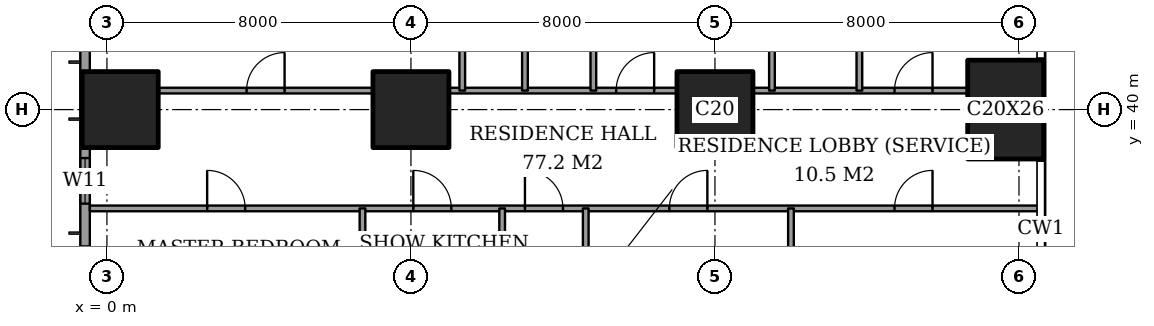
"""IFC4 building model, lengths in metres.
Left out: names, types, materials, properties, quantities, classifications, styles, units other than length and angle.
Written with IfcOpenShell. Run it as: python <this file> out.ifc"""

import sys

from ifc_helpers import new_model, si_unit, direction, frame, frame_2d, origin, origin_2d, place, context, subcontext, project, spatial, rectangle, extrude, element, fill, save


model = new_model("IFC4")
c1 = context("Model", 3, precision=1e-05, world=origin(), true_north=direction((0.0, 1.0)))
c2 = subcontext(c1, "Body", "Model", "MODEL_VIEW")
j1 = project(units=[si_unit("LENGTHUNIT", "METRE"), si_unit("PLANEANGLEUNIT", "RADIAN")], contexts=[c1])
p1 = place(None, origin())
s1 = spatial("IfcSite", under=j1, at=p1, CompositionType="ELEMENT")
p2 = place(p1, origin())
s2 = spatial("IfcBuilding", under=s1, at=p2, CompositionType="ELEMENT")
p3 = place(p2, frame((0.0, 0.0, 164.6)))
s3 = spatial("IfcBuildingStorey", under=s2, at=p3, CompositionType="ELEMENT", Elevation=164.6)
for number, where, z_axis, x_axis in (
    (1, (0.35, 40.0, 0.0), (0.0, 0.0, 1.0), (1.0, 0.0, 0.0)),
    (2, (8.0, 40.0, 0.0), (0.0, 0.0, 1.0), (1.0, 0.0, 0.0)),
    (3, (16.0, 40.0, 0.0), (0.0, 0.0, 1.0), (1.0, 0.0, 0.0)),
):
    element("IfcColumn", number, at=place(p3, frame(where, z_axis=z_axis, x_axis=x_axis)), inside=s3, PredefinedType="COLUMN", context=c2, shape_type="SweptSolid", body=[
        extrude(rectangle(XDim=2.0, YDim=2.0, at=origin_2d()), origin(), (0.0, 0.0, 1.0), 3.6),
    ])
p4 = place(p3, frame((23.65, 40.0, 0.0), z_axis=(0.0, 0.0, 1.0), x_axis=(1.0, 0.0, 0.0)))
e4 = element("IfcColumn", 4, at=p4, inside=s3, PredefinedType="COLUMN", context=c2, shape_type="SweptSolid", body=[
    extrude(rectangle(XDim=2.0, YDim=2.6, at=origin_2d()), origin(), (0.0, 0.0, 1.0), 3.6),
])
p5 = place(p3, frame((-0.575, 44.825, 0.0), z_axis=(0.0, 0.0, 1.0), x_axis=(0.0, -1.0, 0.0)))
e5 = element("IfcWall", 5, at=p5, inside=s3, PredefinedType="SOLIDWALL", context=c2, shape_type="SweptSolid", body=[
    extrude(rectangle(XDim=41.65, YDim=0.25, at=frame_2d((20.825, 0.0))), origin(), (0.0, 0.0, 1.0), 3.6),
])
p6 = place(p5, frame((0.775, 0.0, 0.4)))
e6 = element("IfcOpeningElement", 6, at=p6, cuts=e5, PredefinedType="OPENING", context=c2, shape_type="SweptSolid", body=[
    extrude(rectangle(XDim=2.4, YDim=2.2, at=frame_2d((1.2, 1.1))), frame((0.0, 0.135, 0.0), z_axis=(0.0, -1.0, 0.0), x_axis=(1.0, 0.0, 0.0)), (0.0, 0.0, 1.0), 0.27),
])
p7 = place(p5, frame((6.1, 0.0, 0.4)))
e7 = element("IfcOpeningElement", 7, at=p7, cuts=e5, PredefinedType="OPENING", context=c2, shape_type="SweptSolid", body=[
    extrude(rectangle(XDim=1.2, YDim=2.2, at=frame_2d((0.6, 1.1))), frame((0.0, 0.135, 0.0), z_axis=(0.0, -1.0, 0.0), x_axis=(1.0, 0.0, 0.0)), (0.0, 0.0, 1.0), 0.27),
])
p8 = place(p5, frame((8.425, 0.0, 0.4)))
e8 = element("IfcOpeningElement", 8, at=p8, cuts=e5, PredefinedType="OPENING", context=c2, shape_type="SweptSolid", body=[
    extrude(rectangle(XDim=2.4, YDim=2.2, at=frame_2d((1.2, 1.1))), frame((0.0, 0.135, 0.0), z_axis=(0.0, -1.0, 0.0), x_axis=(1.0, 0.0, 0.0)), (0.0, 0.0, 1.0), 0.27),
])
p9 = place(p5, frame((15.625, 0.0, 0.4)))
e9 = element("IfcOpeningElement", 9, at=p9, cuts=e5, PredefinedType="OPENING", context=c2, shape_type="SweptSolid", body=[
    extrude(rectangle(XDim=2.4, YDim=2.2, at=frame_2d((1.2, 1.1))), frame((0.0, 0.135, 0.0), z_axis=(0.0, -1.0, 0.0), x_axis=(1.0, 0.0, 0.0)), (0.0, 0.0, 1.0), 0.27),
])
p10 = place(p5, frame((23.625, 0.0, 0.4)))
e10 = element("IfcOpeningElement", 10, at=p10, cuts=e5, PredefinedType="OPENING", context=c2, shape_type="SweptSolid", body=[
    extrude(rectangle(XDim=2.4, YDim=2.2, at=frame_2d((1.2, 1.1))), frame((0.0, 0.135, 0.0), z_axis=(0.0, -1.0, 0.0), x_axis=(1.0, 0.0, 0.0)), (0.0, 0.0, 1.0), 0.27),
])
p11 = place(p5, frame((30.825, 0.0, 0.4)))
e11 = element("IfcOpeningElement", 11, at=p11, cuts=e5, PredefinedType="OPENING", context=c2, shape_type="SweptSolid", body=[
    extrude(rectangle(XDim=2.4, YDim=2.2, at=frame_2d((1.2, 1.1))), frame((0.0, 0.135, 0.0), z_axis=(0.0, -1.0, 0.0), x_axis=(1.0, 0.0, 0.0)), (0.0, 0.0, 1.0), 0.27),
])
p12 = place(p5, frame((34.5, 0.0, 0.4)))
e12 = element("IfcOpeningElement", 12, at=p12, cuts=e5, PredefinedType="OPENING", context=c2, shape_type="SweptSolid", body=[
    extrude(rectangle(XDim=1.2, YDim=2.2, at=frame_2d((0.6, 1.1))), frame((0.0, 0.135, 0.0), z_axis=(0.0, -1.0, 0.0), x_axis=(1.0, 0.0, 0.0)), (0.0, 0.0, 1.0), 0.27),
])
p13 = place(p5, frame((38.475, 0.0, 0.4)))
e13 = element("IfcOpeningElement", 13, at=p13, cuts=e5, PredefinedType="OPENING", context=c2, shape_type="SweptSolid", body=[
    extrude(rectangle(XDim=2.4, YDim=2.2, at=frame_2d((1.2, 1.1))), frame((0.0, 0.135, 0.0), z_axis=(0.0, -1.0, 0.0), x_axis=(1.0, 0.0, 0.0)), (0.0, 0.0, 1.0), 0.27),
])
p14 = place(p3, frame((-0.45, 37.4, 0.0), z_axis=(0.0, 0.0, 1.0), x_axis=(1.0, 0.0, 0.0)))
e14 = element("IfcWall", 14, at=p14, inside=s3, PredefinedType="PARTITIONING", context=c2, shape_type="SweptSolid", body=[
    extrude(rectangle(XDim=25.011, YDim=0.15, at=frame_2d((12.505, 0.0))), origin(), (0.0, 0.0, 1.0), 3.35),
])
p15 = place(p14, frame((11.45, 0.0, 0.0)))
e15 = element("IfcOpeningElement", 15, at=p15, cuts=e14, PredefinedType="OPENING", context=c2, shape_type="SweptSolid", body=[
    extrude(rectangle(XDim=1.0, YDim=2.1, at=frame_2d((0.5, 1.05))), frame((0.0, 0.085, 0.0), z_axis=(0.0, -1.0, 0.0), x_axis=(1.0, 0.0, 0.0)), (0.0, 0.0, 1.0), 0.17),
])
p16 = place(p14, frame((3.087, 0.0, 0.0)))
e16 = element("IfcOpeningElement", 16, at=p16, cuts=e14, PredefinedType="OPENING", context=c2, shape_type="SweptSolid", body=[
    extrude(rectangle(XDim=1.0, YDim=2.1, at=frame_2d((0.5, 1.05))), frame((0.0, 0.085, 0.0), z_axis=(0.0, -1.0, 0.0), x_axis=(1.0, 0.0, 0.0)), (0.0, 0.0, 1.0), 0.17),
])
p17 = place(p14, frame((8.512, 0.0, 0.0)))
e17 = element("IfcOpeningElement", 17, at=p17, cuts=e14, PredefinedType="OPENING", context=c2, shape_type="SweptSolid", body=[
    extrude(rectangle(XDim=1.0, YDim=2.1, at=frame_2d((0.5, 1.05))), frame((0.0, 0.085, 0.0), z_axis=(0.0, -1.0, 0.0), x_axis=(1.0, 0.0, 0.0)), (0.0, 0.0, 1.0), 0.17),
])
p18 = place(p14, frame((15.25, 0.0, 0.0)))
e18 = element("IfcOpeningElement", 18, at=p18, cuts=e14, PredefinedType="OPENING", context=c2, shape_type="SweptSolid", body=[
    extrude(rectangle(XDim=1.0, YDim=2.1, at=frame_2d((0.5, 1.05))), frame((0.0, 0.085, 0.0), z_axis=(0.0, -1.0, 0.0), x_axis=(1.0, 0.0, 0.0)), (0.0, 0.0, 1.0), 0.17),
])
p19 = place(p14, frame((21.175, 0.0, 0.0)))
e19 = element("IfcOpeningElement", 19, at=p19, cuts=e14, PredefinedType="OPENING", context=c2, shape_type="SweptSolid", body=[
    extrude(rectangle(XDim=1.0, YDim=2.1, at=frame_2d((0.5, 1.05))), frame((0.0, 0.085, 0.0), z_axis=(0.0, -1.0, 0.0), x_axis=(1.0, 0.0, 0.0)), (0.0, 0.0, 1.0), 0.17),
])
p20 = place(p3, frame((1.35, 40.5, 0.0), z_axis=(0.0, 0.0, 1.0), x_axis=(1.0, 0.0, 0.0)))
e20 = element("IfcWall", 20, at=p20, inside=s3, PredefinedType="PARTITIONING", context=c2, shape_type="SweptSolid", body=[
    extrude(rectangle(XDim=5.65, YDim=0.15, at=frame_2d((2.825, 0.0))), origin(), (0.0, 0.0, 1.0), 3.35),
])
p21 = place(p20, frame((2.325, 0.0, 0.0)))
e21 = element("IfcOpeningElement", 21, at=p21, cuts=e20, PredefinedType="OPENING", context=c2, shape_type="SweptSolid", body=[
    extrude(rectangle(XDim=1.0, YDim=2.1, at=frame_2d((0.5, 1.05))), frame((0.0, 0.085, 0.0), z_axis=(0.0, -1.0, 0.0), x_axis=(1.0, 0.0, 0.0)), (0.0, 0.0, 1.0), 0.17),
])
p22 = place(p3, frame((9.0, 40.5, 0.0), z_axis=(0.0, 0.0, 1.0), x_axis=(1.0, 0.0, 0.0)))
e22 = element("IfcWall", 22, at=p22, inside=s3, PredefinedType="PARTITIONING", context=c2, shape_type="SweptSolid", body=[
    extrude(rectangle(XDim=6.0, YDim=0.15, at=frame_2d((3.0, 0.0))), origin(), (0.0, 0.0, 1.0), 3.35),
])
p23 = place(p22, frame((4.4, 0.0, 0.0)))
e23 = element("IfcOpeningElement", 23, at=p23, cuts=e22, PredefinedType="OPENING", context=c2, shape_type="SweptSolid", body=[
    extrude(rectangle(XDim=1.0, YDim=2.1, at=frame_2d((0.5, 1.05))), frame((0.0, 0.085, 0.0), z_axis=(0.0, -1.0, 0.0), x_axis=(1.0, 0.0, 0.0)), (0.0, 0.0, 1.0), 0.17),
])
p24 = place(p3, frame((17.0, 40.5, 0.0), z_axis=(0.0, 0.0, 1.0), x_axis=(1.0, 0.0, 0.0)))
e24 = element("IfcWall", 24, at=p24, inside=s3, PredefinedType="PARTITIONING", context=c2, shape_type="SweptSolid", body=[
    extrude(rectangle(XDim=5.65, YDim=0.15, at=frame_2d((2.825, 0.0))), origin(), (0.0, 0.0, 1.0), 3.35),
])
p25 = place(p24, frame((3.725, 0.0, 0.0)))
e25 = element("IfcOpeningElement", 25, at=p25, cuts=e24, PredefinedType="OPENING", context=c2, shape_type="SweptSolid", body=[
    extrude(rectangle(XDim=1.0, YDim=2.1, at=frame_2d((0.5, 1.05))), frame((0.0, 0.085, 0.0), z_axis=(0.0, -1.0, 0.0), x_axis=(1.0, 0.0, 0.0)), (0.0, 0.0, 1.0), 0.17),
])
p26 = place(p3, frame((6.725, 33.2, 0.0), z_axis=(0.0, 0.0, 1.0), x_axis=(0.0, 1.0, 0.0)))
e26 = element("IfcWall", 26, at=p26, inside=s3, PredefinedType="PARTITIONING", context=c2, shape_type="SweptSolid", body=[
    extrude(rectangle(XDim=4.2, YDim=0.15, at=frame_2d((2.1, 0.0))), origin(), (0.0, 0.0, 1.0), 3.35),
])
p27 = place(p3, frame((9.35, 40.5, 0.0), z_axis=(0.0, 0.0, 1.0), x_axis=(0.0, 1.0, 0.0)))
e27 = element("IfcWall", 27, at=p27, inside=s3, PredefinedType="PARTITIONING", context=c2, shape_type="SweptSolid", body=[
    extrude(rectangle(XDim=7.95, YDim=0.15, at=frame_2d((3.975, 0.0))), origin(), (0.0, 0.0, 1.0), 3.35),
])
p28 = place(p27, frame((3.525, 0.0, 0.0)))
e28 = element("IfcOpeningElement", 28, at=p28, cuts=e27, PredefinedType="OPENING", context=c2, shape_type="SweptSolid", body=[
    extrude(rectangle(XDim=0.9, YDim=2.1, at=frame_2d((0.45, 1.05))), frame((0.0, 0.085, 0.0), z_axis=(0.0, -1.0, 0.0), x_axis=(1.0, 0.0, 0.0)), (0.0, 0.0, 1.0), 0.17),
])
p29 = place(p3, frame((10.4, 28.0, 0.0), z_axis=(0.0, 0.0, 1.0), x_axis=(0.0, 1.0, 0.0)))
e29 = element("IfcWall", 29, at=p29, inside=s3, PredefinedType="PARTITIONING", context=c2, shape_type="SweptSolid", body=[
    extrude(rectangle(XDim=9.4, YDim=0.15, at=frame_2d((4.7, 0.0))), origin(), (0.0, 0.0, 1.0), 3.35),
])
p30 = place(p29, frame((0.837, 0.0, 0.0)))
e30 = element("IfcOpeningElement", 30, at=p30, cuts=e29, PredefinedType="OPENING", context=c2, shape_type="SweptSolid", body=[
    extrude(rectangle(XDim=1.0, YDim=2.1, at=frame_2d((0.5, 1.05))), frame((0.0, 0.085, 0.0), z_axis=(0.0, -1.0, 0.0), x_axis=(1.0, 0.0, 0.0)), (0.0, 0.0, 1.0), 0.17),
])
p31 = place(p3, frame((11.0, 40.5, 0.0), z_axis=(0.0, 0.0, 1.0), x_axis=(0.0, 1.0, 0.0)))
e31 = element("IfcWall", 31, at=p31, inside=s3, PredefinedType="PARTITIONING", context=c2, shape_type="SweptSolid", body=[
    extrude(rectangle(XDim=7.95, YDim=0.15, at=frame_2d((3.975, 0.0))), origin(), (0.0, 0.0, 1.0), 3.35),
])
p32 = place(p3, frame((12.6, 30.675, 0.0), z_axis=(0.0, 0.0, 1.0), x_axis=(0.0, 1.0, 0.0)))
e32 = element("IfcWall", 32, at=p32, inside=s3, PredefinedType="PARTITIONING", context=c2, shape_type="SweptSolid", body=[
    extrude(rectangle(XDim=6.725, YDim=0.15, at=frame_2d((3.362, 0.0))), origin(), (0.0, 0.0, 1.0), 3.35),
])
p33 = place(p3, frame((12.8, 40.5, 0.0), z_axis=(0.0, 0.0, 1.0), x_axis=(0.0, 1.0, 0.0)))
e33 = element("IfcWall", 33, at=p33, inside=s3, PredefinedType="PARTITIONING", context=c2, shape_type="SweptSolid", body=[
    extrude(rectangle(XDim=7.95, YDim=0.15, at=frame_2d((3.975, 0.0))), origin(), (0.0, 0.0, 1.0), 3.35),
])
p34 = place(p33, frame((3.525, 0.0, 0.0)))
e34 = element("IfcOpeningElement", 34, at=p34, cuts=e33, PredefinedType="OPENING", context=c2, shape_type="SweptSolid", body=[
    extrude(rectangle(XDim=0.9, YDim=2.1, at=frame_2d((0.45, 1.05))), frame((0.0, 0.085, 0.0), z_axis=(0.0, -1.0, 0.0), x_axis=(1.0, 0.0, 0.0)), (0.0, 0.0, 1.0), 0.17),
])
p35 = place(p3, frame((17.5, 40.5, 0.0), z_axis=(0.0, 0.0, 1.0), x_axis=(0.0, 1.0, 0.0)))
e35 = element("IfcWall", 35, at=p35, inside=s3, PredefinedType="PARTITIONING", context=c2, shape_type="SweptSolid", body=[
    extrude(rectangle(XDim=7.95, YDim=0.15, at=frame_2d((3.975, 0.0))), origin(), (0.0, 0.0, 1.0), 3.35),
])
p36 = place(p3, frame((18.0, 33.5, 0.0), z_axis=(0.0, 0.0, 1.0), x_axis=(0.0, 1.0, 0.0)))
e36 = element("IfcWall", 36, at=p36, inside=s3, PredefinedType="PARTITIONING", context=c2, shape_type="SweptSolid", body=[
    extrude(rectangle(XDim=3.9, YDim=0.15, at=frame_2d((1.95, 0.0))), origin(), (0.0, 0.0, 1.0), 3.35),
])
p37 = place(p3, frame((19.8, 40.5, 0.0), z_axis=(0.0, 0.0, 1.0), x_axis=(0.0, 1.0, 0.0)))
e37 = element("IfcWall", 37, at=p37, inside=s3, PredefinedType="PARTITIONING", context=c2, shape_type="SweptSolid", body=[
    extrude(rectangle(XDim=7.95, YDim=0.15, at=frame_2d((3.975, 0.0))), origin(), (0.0, 0.0, 1.0), 3.35),
])
p38 = place(p37, frame((3.525, 0.0, 0.0)))
e38 = element("IfcOpeningElement", 38, at=p38, cuts=e37, PredefinedType="OPENING", context=c2, shape_type="SweptSolid", body=[
    extrude(rectangle(XDim=0.9, YDim=2.1, at=frame_2d((0.45, 1.05))), frame((0.0, 0.085, 0.0), z_axis=(0.0, -1.0, 0.0), x_axis=(1.0, 0.0, 0.0)), (0.0, 0.0, 1.0), 0.17),
])
p39 = place(p7, origin())
e39 = element("IfcWindow", 39, at=p39, inside=s3, PartitioningType="SINGLE_PANEL", PredefinedType="WINDOW", context=c2, shape_type="SweptSolid", body=[
    extrude(rectangle(XDim=1.2, YDim=2.2, at=frame_2d((0.6, 1.1))), frame((0.0, 0.03, 0.0), z_axis=(0.0, -1.0, 0.0), x_axis=(1.0, 0.0, 0.0)), (0.0, 0.0, 1.0), 0.06),
])
fill(e7, e39)
p40 = place(p21, origin())
e40 = element("IfcDoor", 40, at=p40, inside=s3, OperationType="SINGLE_SWING_LEFT", PredefinedType="DOOR", context=c2, shape_type="SweptSolid", body=[
    extrude(rectangle(XDim=1.0, YDim=2.1, at=frame_2d((0.5, 1.05))), frame((0.0, 0.025, 0.0), z_axis=(0.0, -1.0, 0.0), x_axis=(1.0, 0.0, 0.0)), (0.0, 0.0, 1.0), 0.05),
])
fill(e21, e40)
p41 = place(p23, origin())
e41 = element("IfcDoor", 41, at=p41, inside=s3, OperationType="SINGLE_SWING_LEFT", PredefinedType="DOOR", context=c2, shape_type="SweptSolid", body=[
    extrude(rectangle(XDim=1.0, YDim=2.1, at=frame_2d((0.5, 1.05))), frame((0.0, 0.025, 0.0), z_axis=(0.0, -1.0, 0.0), x_axis=(1.0, 0.0, 0.0)), (0.0, 0.0, 1.0), 0.05),
])
fill(e23, e41)
p42 = place(p25, origin())
e42 = element("IfcDoor", 42, at=p42, inside=s3, OperationType="SINGLE_SWING_LEFT", PredefinedType="DOOR", context=c2, shape_type="SweptSolid", body=[
    extrude(rectangle(XDim=1.0, YDim=2.1, at=frame_2d((0.5, 1.05))), frame((0.0, 0.025, 0.0), z_axis=(0.0, -1.0, 0.0), x_axis=(1.0, 0.0, 0.0)), (0.0, 0.0, 1.0), 0.05),
])
fill(e25, e42)
p43 = place(p15, origin())
e43 = element("IfcDoor", 43, at=p43, inside=s3, OperationType="SINGLE_SWING_RIGHT", PredefinedType="DOOR", context=c2, shape_type="SweptSolid", body=[
    extrude(rectangle(XDim=1.0, YDim=2.1, at=frame_2d((0.5, 1.05))), frame((0.0, 0.025, 0.0), z_axis=(0.0, -1.0, 0.0), x_axis=(1.0, 0.0, 0.0)), (0.0, 0.0, 1.0), 0.05),
])
fill(e15, e43)
p44 = place(p16, origin())
e44 = element("IfcDoor", 44, at=p44, inside=s3, OperationType="SINGLE_SWING_RIGHT", PredefinedType="DOOR", context=c2, shape_type="SweptSolid", body=[
    extrude(rectangle(XDim=1.0, YDim=2.1, at=frame_2d((0.5, 1.05))), frame((0.0, 0.025, 0.0), z_axis=(0.0, -1.0, 0.0), x_axis=(1.0, 0.0, 0.0)), (0.0, 0.0, 1.0), 0.05),
])
fill(e16, e44)
p45 = place(p17, origin())
e45 = element("IfcDoor", 45, at=p45, inside=s3, OperationType="SINGLE_SWING_RIGHT", PredefinedType="DOOR", context=c2, shape_type="SweptSolid", body=[
    extrude(rectangle(XDim=1.0, YDim=2.1, at=frame_2d((0.5, 1.05))), frame((0.0, 0.025, 0.0), z_axis=(0.0, -1.0, 0.0), x_axis=(1.0, 0.0, 0.0)), (0.0, 0.0, 1.0), 0.05),
])
fill(e17, e45)
p46 = place(p18, origin())
e46 = element("IfcDoor", 46, at=p46, inside=s3, OperationType="SINGLE_SWING_LEFT", PredefinedType="DOOR", context=c2, shape_type="SweptSolid", body=[
    extrude(rectangle(XDim=1.0, YDim=2.1, at=frame_2d((0.5, 1.05))), frame((0.0, 0.025, 0.0), z_axis=(0.0, -1.0, 0.0), x_axis=(1.0, 0.0, 0.0)), (0.0, 0.0, 1.0), 0.05),
])
fill(e18, e46)
p47 = place(p19, origin())
e47 = element("IfcDoor", 47, at=p47, inside=s3, OperationType="SINGLE_SWING_LEFT", PredefinedType="DOOR", context=c2, shape_type="SweptSolid", body=[
    extrude(rectangle(XDim=1.0, YDim=2.1, at=frame_2d((0.5, 1.05))), frame((0.0, 0.025, 0.0), z_axis=(0.0, -1.0, 0.0), x_axis=(1.0, 0.0, 0.0)), (0.0, 0.0, 1.0), 0.05),
])
fill(e19, e47)
save(model, sys.argv[1])
